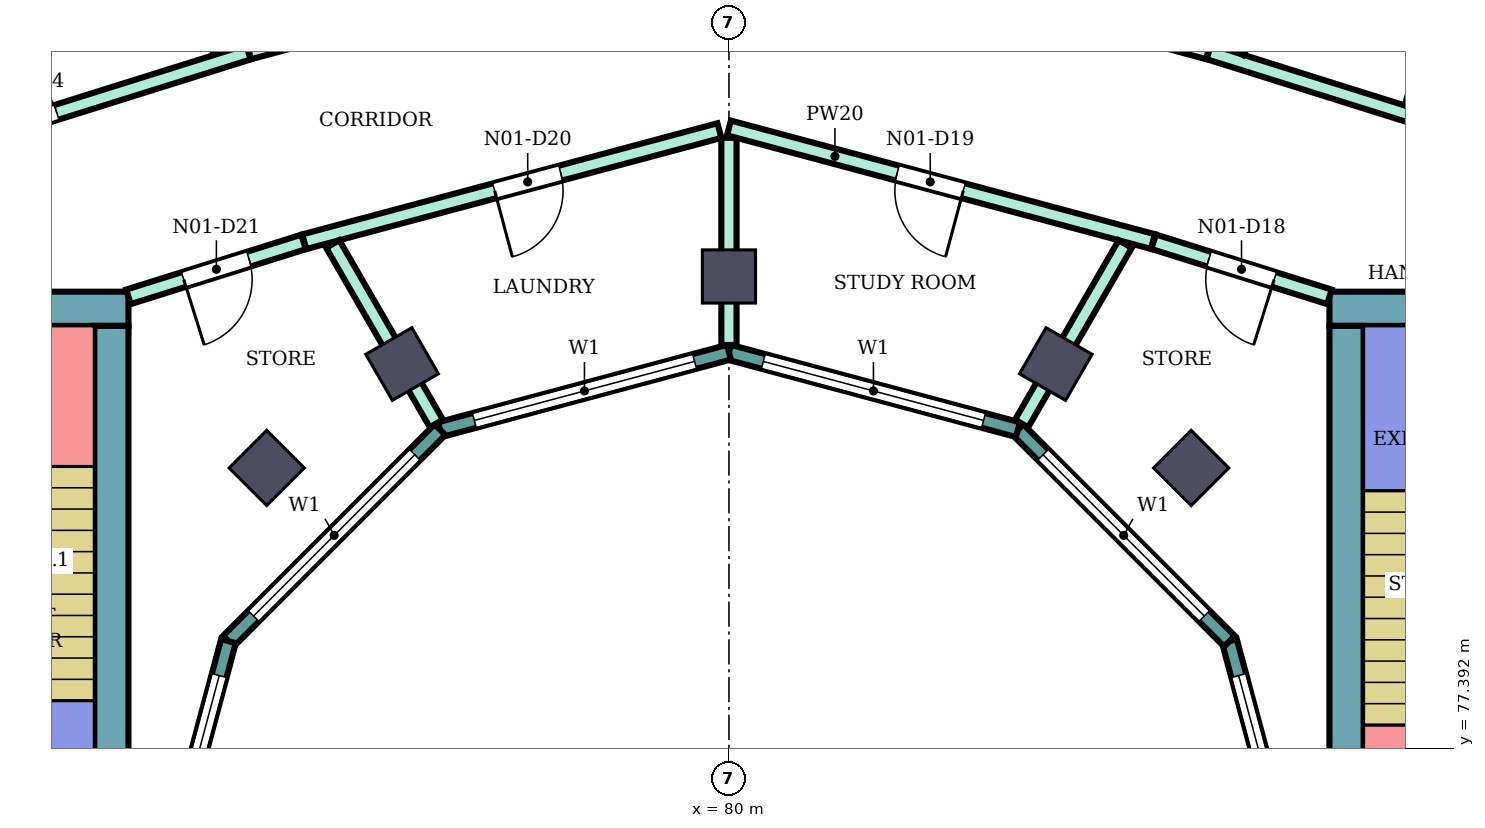
"""IFC4 building model, lengths in metres.
Left out: names, types, materials, properties, quantities, classifications, styles, units other than length and angle.
Written with IfcOpenShell. Run it as: python <this file> out.ifc"""

import sys

from ifc_helpers import new_model, si_unit, direction, frame, frame_2d, origin, origin_2d, place, context, subcontext, project, spatial, rectangle, extrude, element, fill, save


model = new_model("IFC4")
c1 = context("Model", 3, precision=1e-05, world=origin(), true_north=direction((0.0, 1.0)))
c2 = subcontext(c1, "Body", "Model", "MODEL_VIEW")
j1 = project(units=[si_unit("LENGTHUNIT", "METRE"), si_unit("PLANEANGLEUNIT", "RADIAN")], contexts=[c1])
p1 = place(None, origin())
s1 = spatial("IfcSite", under=j1, at=p1, CompositionType="ELEMENT")
p2 = place(p1, origin())
s2 = spatial("IfcBuilding", under=s1, at=p2, CompositionType="ELEMENT")
p3 = place(p2, frame((0.0, 0.0, 284.1)))
s3 = spatial("IfcBuildingStorey", under=s2, at=p3, CompositionType="ELEMENT", Elevation=284.1)
for number, where, z_axis, x_axis in (
    (1, (86.081, 81.081, 0.0), (0.0, 0.0, 1.0), (0.707, 0.707, 0.0)),
    (2, (84.3, 82.448, 0.0), (0.0, 0.0, 1.0), (0.5, 0.866, 0.0)),
    (3, (80.0, 83.6, 0.0), (0.0, 0.0, 1.0), (0.0, 1.0, 0.0)),
    (4, (75.7, 82.448, 0.0), (0.0, 0.0, 1.0), (-0.5, 0.866, 0.0)),
    (5, (73.919, 81.081, 0.0), (0.0, 0.0, 1.0), (-0.707, 0.707, 0.0)),
):
    element("IfcColumn", number, at=place(p3, frame(where, z_axis=z_axis, x_axis=x_axis)), inside=s3, PredefinedType="COLUMN", context=c2, shape_type="SweptSolid", body=[
        extrude(rectangle(XDim=0.7, YDim=0.7, at=origin_2d()), origin(), (0.0, 0.0, 1.0), 4.2),
    ])
p4 = place(p3, frame((87.9, 83.175, 0.0), z_axis=(0.0, 0.0, 1.0), x_axis=(1.0, 0.0, 0.0)))
e6 = element("IfcWall", 6, at=p4, inside=s3, PredefinedType="SHEAR", context=c2, shape_type="SweptSolid", body=[
    extrude(rectangle(XDim=13.55, YDim=0.45, at=frame_2d((6.775, 0.0))), origin(), (0.0, 0.0, 1.0), 3.88),
])
p5 = place(p4, frame((4.2, 0.0, 0.0)))
e7 = element("IfcOpeningElement", 7, at=p5, cuts=e6, PredefinedType="OPENING", context=c2, shape_type="SweptSolid", body=[
    extrude(rectangle(XDim=2.4, YDim=2.4, at=frame_2d((1.2, 1.2))), frame((0.0, 0.235, 0.0), z_axis=(0.0, -1.0, 0.0), x_axis=(1.0, 0.0, 0.0)), (0.0, 0.0, 1.0), 0.47),
])
p6 = place(p3, frame((88.125, 75.0, 0.0), z_axis=(0.0, 0.0, 1.0), x_axis=(0.0, 1.0, 0.0)))
e8 = element("IfcWall", 8, at=p6, inside=s3, PredefinedType="SHEAR", context=c2, shape_type="SweptSolid", body=[
    extrude(rectangle(XDim=7.95, YDim=0.45, at=frame_2d((3.975, 0.0))), origin(), (0.0, 0.0, 1.0), 3.88),
])
p7 = place(p3, frame((72.1, 83.175, 0.0), z_axis=(0.0, 0.0, 1.0), x_axis=(-1.0, 0.0, 0.0)))
e9 = element("IfcWall", 9, at=p7, inside=s3, PredefinedType="SHEAR", context=c2, shape_type="SweptSolid", body=[
    extrude(rectangle(XDim=13.55, YDim=0.45, at=frame_2d((6.775, 0.0))), origin(), (0.0, 0.0, 1.0), 3.88),
])
p8 = place(p7, frame((4.2, 0.0, 0.0)))
e10 = element("IfcOpeningElement", 10, at=p8, cuts=e9, PredefinedType="OPENING", context=c2, shape_type="SweptSolid", body=[
    extrude(rectangle(XDim=2.4, YDim=2.4, at=frame_2d((1.2, 1.2))), frame((0.0, 0.235, 0.0), z_axis=(0.0, -1.0, 0.0), x_axis=(1.0, 0.0, 0.0)), (0.0, 0.0, 1.0), 0.47),
])
p9 = place(p3, frame((71.875, 82.95, 0.0), z_axis=(0.0, 0.0, 1.0), x_axis=(0.0, -1.0, 0.0)))
e11 = element("IfcWall", 11, at=p9, inside=s3, PredefinedType="SHEAR", context=c2, shape_type="SweptSolid", body=[
    extrude(rectangle(XDim=7.95, YDim=0.45, at=frame_2d((3.975, 0.0))), origin(), (0.0, 0.0, 1.0), 3.88),
])
p10 = place(p3, frame((87.604, 75.0, 0.0), z_axis=(0.0, 0.0, 1.0), x_axis=(-0.258789828301, 0.965933654434, 0.0)))
e12 = element("IfcWall", 12, at=p10, inside=s3, PredefinedType="NOTDEFINED", context=c2, shape_type="SweptSolid", body=[
    extrude(rectangle(XDim=3.936, YDim=0.2, at=frame_2d((1.968, 0.0))), origin(), (0.0, 0.0, 1.0), 4.2),
])
p11 = place(p10, frame((0.468, 0.0, 0.9)))
e13 = element("IfcOpeningElement", 13, at=p11, cuts=e12, PredefinedType="OPENING", context=c2, shape_type="SweptSolid", body=[
    extrude(rectangle(XDim=3.0, YDim=2.3, at=frame_2d((1.5, 1.15))), frame((0.0, 0.11, 0.0), z_axis=(0.0, -1.0, 0.0), x_axis=(1.0, 0.0, 0.0)), (0.0, 0.0, 1.0), 0.22),
])
p12 = place(p3, frame((86.585, 78.802, 0.0), z_axis=(0.0, 0.0, 1.0), x_axis=(-0.707106781187, 0.707106781187, 0.0)))
e14 = element("IfcWall", 14, at=p12, inside=s3, PredefinedType="NOTDEFINED", context=c2, shape_type="SweptSolid", body=[
    extrude(rectangle(XDim=3.936, YDim=0.2, at=frame_2d((1.968, 0.0))), origin(), (0.0, 0.0, 1.0), 4.2),
])
p13 = place(p12, frame((0.468, 0.0, 0.9)))
e15 = element("IfcOpeningElement", 15, at=p13, cuts=e14, PredefinedType="OPENING", context=c2, shape_type="SweptSolid", body=[
    extrude(rectangle(XDim=3.0, YDim=2.3, at=frame_2d((1.5, 1.15))), frame((0.0, 0.11, 0.0), z_axis=(0.0, -1.0, 0.0), x_axis=(1.0, 0.0, 0.0)), (0.0, 0.0, 1.0), 0.22),
])
p14 = place(p3, frame((83.802, 81.585, 0.0), z_axis=(0.0, 0.0, 1.0), x_axis=(-0.965933654434, 0.258789828301, 0.0)))
e16 = element("IfcWall", 16, at=p14, inside=s3, PredefinedType="NOTDEFINED", context=c2, shape_type="SweptSolid", body=[
    extrude(rectangle(XDim=3.936, YDim=0.2, at=frame_2d((1.968, 0.0))), origin(), (0.0, 0.0, 1.0), 4.2),
])
p15 = place(p14, frame((0.468, 0.0, 0.9)))
e17 = element("IfcOpeningElement", 17, at=p15, cuts=e16, PredefinedType="OPENING", context=c2, shape_type="SweptSolid", body=[
    extrude(rectangle(XDim=3.0, YDim=2.3, at=frame_2d((1.5, 1.15))), frame((0.0, 0.11, 0.0), z_axis=(0.0, -1.0, 0.0), x_axis=(1.0, 0.0, 0.0)), (0.0, 0.0, 1.0), 0.22),
])
p16 = place(p3, frame((80.0, 82.604, 0.0), z_axis=(0.0, 0.0, 1.0), x_axis=(-0.965933654434, -0.258789828301, 0.0)))
e18 = element("IfcWall", 18, at=p16, inside=s3, PredefinedType="NOTDEFINED", context=c2, shape_type="SweptSolid", body=[
    extrude(rectangle(XDim=3.936, YDim=0.2, at=frame_2d((1.968, 0.0))), origin(), (0.0, 0.0, 1.0), 4.2),
])
p17 = place(p16, frame((0.468, 0.0, 0.9)))
e19 = element("IfcOpeningElement", 19, at=p17, cuts=e18, PredefinedType="OPENING", context=c2, shape_type="SweptSolid", body=[
    extrude(rectangle(XDim=3.0, YDim=2.3, at=frame_2d((1.5, 1.15))), frame((0.0, 0.11, 0.0), z_axis=(0.0, -1.0, 0.0), x_axis=(1.0, 0.0, 0.0)), (0.0, 0.0, 1.0), 0.22),
])
p18 = place(p3, frame((76.198, 81.585, 0.0), z_axis=(0.0, 0.0, 1.0), x_axis=(-0.707106781187, -0.707106781187, 0.0)))
e20 = element("IfcWall", 20, at=p18, inside=s3, PredefinedType="NOTDEFINED", context=c2, shape_type="SweptSolid", body=[
    extrude(rectangle(XDim=3.936, YDim=0.2, at=frame_2d((1.968, 0.0))), origin(), (0.0, 0.0, 1.0), 4.2),
])
p19 = place(p18, frame((0.468, 0.0, 0.9)))
e21 = element("IfcOpeningElement", 21, at=p19, cuts=e20, PredefinedType="OPENING", context=c2, shape_type="SweptSolid", body=[
    extrude(rectangle(XDim=3.0, YDim=2.3, at=frame_2d((1.5, 1.15))), frame((0.0, 0.11, 0.0), z_axis=(0.0, -1.0, 0.0), x_axis=(1.0, 0.0, 0.0)), (0.0, 0.0, 1.0), 0.22),
])
p20 = place(p3, frame((73.415, 78.802, 0.0), z_axis=(0.0, 0.0, 1.0), x_axis=(-0.258789828301, -0.965933654434, 0.0)))
e22 = element("IfcWall", 22, at=p20, inside=s3, PredefinedType="NOTDEFINED", context=c2, shape_type="SweptSolid", body=[
    extrude(rectangle(XDim=3.936, YDim=0.2, at=frame_2d((1.968, 0.0))), origin(), (0.0, 0.0, 1.0), 4.2),
])
p21 = place(p20, frame((0.468, 0.0, 0.9)))
e23 = element("IfcOpeningElement", 23, at=p21, cuts=e22, PredefinedType="OPENING", context=c2, shape_type="SweptSolid", body=[
    extrude(rectangle(XDim=3.0, YDim=2.3, at=frame_2d((1.5, 1.15))), frame((0.0, 0.11, 0.0), z_axis=(0.0, -1.0, 0.0), x_axis=(1.0, 0.0, 0.0)), (0.0, 0.0, 1.0), 0.22),
])
p22 = place(p3, frame((67.852, 96.042, 0.0), z_axis=(0.0, 0.0, 1.0), x_axis=(0.499960582802, -0.866048160118, 0.0)))
e24 = element("IfcWall", 24, at=p22, inside=s3, PredefinedType="PARTITIONING", context=c2, shape_type="SweptSolid", body=[
    extrude(rectangle(XDim=10.946, YDim=0.2, at=frame_2d((5.473, 0.0))), origin(), (0.0, 0.0, 1.0), 3.75),
])
p23 = place(p3, frame((68.2, 84.833, 0.0), z_axis=(0.0, 0.0, 1.0), x_axis=(0.954191968402, 0.299195065863, 0.0)))
e25 = element("IfcWall", 25, at=p23, inside=s3, PredefinedType="PARTITIONING", context=c2, shape_type="SweptSolid", body=[
    extrude(rectangle(XDim=5.74, YDim=0.2, at=frame_2d((2.87, 0.0))), origin(), (0.0, 0.0, 1.0), 3.75),
])
p24 = place(p23, frame((2.097, 0.0, 0.0)))
e26 = element("IfcOpeningElement", 26, at=p24, cuts=e25, PredefinedType="OPENING", context=c2, shape_type="SweptSolid", body=[
    extrude(rectangle(XDim=1.0, YDim=2.1, at=frame_2d((0.5, 1.05))), frame((0.0, 0.11, 0.0), z_axis=(0.0, -1.0, 0.0), x_axis=(1.0, 0.0, 0.0)), (0.0, 0.0, 1.0), 0.22),
])
p25 = place(p3, frame((72.1, 83.332, 0.0), z_axis=(0.0, 0.0, 1.0), x_axis=(0.954233106619, 0.299063836383, 0.0)))
e27 = element("IfcWall", 27, at=p25, inside=s3, PredefinedType="PARTITIONING", context=c2, shape_type="SweptSolid", body=[
    extrude(rectangle(XDim=2.414, YDim=0.2, at=frame_2d((1.207, 0.0))), origin(), (0.0, 0.0, 1.0), 3.75),
])
p26 = place(p25, frame((0.762, 0.0, 0.0)))
e28 = element("IfcOpeningElement", 28, at=p26, cuts=e27, PredefinedType="OPENING", context=c2, shape_type="SweptSolid", body=[
    extrude(rectangle(XDim=0.9, YDim=2.1, at=frame_2d((0.45, 1.05))), frame((0.0, 0.11, 0.0), z_axis=(0.0, -1.0, 0.0), x_axis=(1.0, 0.0, 0.0)), (0.0, 0.0, 1.0), 0.22),
])
p27 = place(p3, frame((73.687, 86.554, 0.0), z_axis=(0.0, 0.0, 1.0), x_axis=(0.966002126521, 0.258534120682, 0.0)))
e29 = element("IfcWall", 29, at=p27, inside=s3, PredefinedType="PARTITIONING", context=c2, shape_type="SweptSolid", body=[
    extrude(rectangle(XDim=6.486, YDim=0.2, at=frame_2d((3.243, 0.0))), origin(), (0.0, 0.0, 1.0), 3.75),
])
p28 = place(p3, frame((74.413, 84.057, 0.0), z_axis=(0.0, 0.0, 1.0), x_axis=(0.965972135939, 0.258646153246, 0.0)))
e30 = element("IfcWall", 30, at=p28, inside=s3, PredefinedType="PARTITIONING", context=c2, shape_type="SweptSolid", body=[
    extrude(rectangle(XDim=5.654, YDim=0.2, at=frame_2d((2.827, 0.0))), origin(), (0.0, 0.0, 1.0), 3.75),
])
p29 = place(p28, frame((2.593, 0.0, 0.0)))
e31 = element("IfcOpeningElement", 31, at=p29, cuts=e30, PredefinedType="OPENING", context=c2, shape_type="SweptSolid", body=[
    extrude(rectangle(XDim=0.9, YDim=2.1, at=frame_2d((0.45, 1.05))), frame((0.0, 0.11, 0.0), z_axis=(0.0, -1.0, 0.0), x_axis=(1.0, 0.0, 0.0)), (0.0, 0.0, 1.0), 0.22),
])
p30 = place(p3, frame((74.788, 84.027, 0.0), z_axis=(0.0, 0.0, 1.0), x_axis=(0.49997314572, -0.866040907555, 0.0)))
e32 = element("IfcWall", 32, at=p30, inside=s3, PredefinedType="PARTITIONING", context=c2, shape_type="SweptSolid", body=[
    extrude(rectangle(XDim=2.726, YDim=0.2, at=frame_2d((1.363, 0.0))), origin(), (0.0, 0.0, 1.0), 3.75),
])
p31 = place(p3, frame((80.0, 82.699, 0.0), z_axis=(0.0, 0.0, 1.0), x_axis=(0.0, 1.0, 0.0)))
e33 = element("IfcWall", 33, at=p31, inside=s3, PredefinedType="PARTITIONING", context=c2, shape_type="SweptSolid", body=[
    extrude(rectangle(XDim=2.725, YDim=0.2, at=frame_2d((1.363, 0.0))), origin(), (0.0, 0.0, 1.0), 3.75),
])
p32 = place(p3, frame((80.0, 85.554, 0.0), z_axis=(0.0, 0.0, 1.0), x_axis=(0.965928989968, -0.258807237802, 0.0)))
e34 = element("IfcWall", 34, at=p32, inside=s3, PredefinedType="PARTITIONING", context=c2, shape_type="SweptSolid", body=[
    extrude(rectangle(XDim=5.774, YDim=0.2, at=frame_2d((2.887, 0.0))), origin(), (0.0, 0.0, 1.0), 3.75),
])
p33 = place(p32, frame((2.292, 0.0, 0.0)))
e35 = element("IfcOpeningElement", 35, at=p33, cuts=e34, PredefinedType="OPENING", context=c2, shape_type="SweptSolid", body=[
    extrude(rectangle(XDim=0.9, YDim=2.1, at=frame_2d((0.45, 1.05))), frame((0.0, 0.11, 0.0), z_axis=(0.0, -1.0, 0.0), x_axis=(1.0, 0.0, 0.0)), (0.0, 0.0, 1.0), 0.22),
])
p34 = place(p3, frame((80.048, 88.233, 0.0), z_axis=(0.0, 0.0, 1.0), x_axis=(0.965865387308, -0.259044501198, 0.0)))
e36 = element("IfcWall", 36, at=p34, inside=s3, PredefinedType="PARTITIONING", context=c2, shape_type="SweptSolid", body=[
    extrude(rectangle(XDim=6.476, YDim=0.2, at=frame_2d((3.238, 0.0))), origin(), (0.0, 0.0, 1.0), 3.75),
])
p35 = place(p34, frame((4.936, 0.0, 0.0)))
e37 = element("IfcOpeningElement", 37, at=p35, cuts=e36, PredefinedType="OPENING", context=c2, shape_type="SweptSolid", body=[
    extrude(rectangle(XDim=1.0, YDim=2.1, at=frame_2d((0.5, 1.05))), frame((0.0, 0.11, 0.0), z_axis=(0.0, -1.0, 0.0), x_axis=(1.0, 0.0, 0.0)), (0.0, 0.0, 1.0), 0.22),
])
p36 = place(p3, frame((83.85, 81.666, 0.0), z_axis=(0.0, 0.0, 1.0), x_axis=(0.500146274735, 0.865940935554, 0.0)))
e38 = element("IfcWall", 38, at=p36, inside=s3, PredefinedType="PARTITIONING", context=c2, shape_type="SweptSolid", body=[
    extrude(rectangle(XDim=2.726, YDim=0.2, at=frame_2d((1.363, 0.0))), origin(), (0.0, 0.0, 1.0), 3.75),
])
p37 = place(p3, frame((85.587, 84.057, 0.0), z_axis=(0.0, 0.0, 1.0), x_axis=(0.954239513179, -0.299043393987, 0.0)))
e39 = element("IfcWall", 39, at=p37, inside=s3, PredefinedType="PARTITIONING", context=c2, shape_type="SweptSolid", body=[
    extrude(rectangle(XDim=2.424, YDim=0.2, at=frame_2d((1.212, 0.0))), origin(), (0.0, 0.0, 1.0), 3.75),
])
p38 = place(p37, frame((0.762, 0.0, 0.0)))
e40 = element("IfcOpeningElement", 40, at=p38, cuts=e39, PredefinedType="OPENING", context=c2, shape_type="SweptSolid", body=[
    extrude(rectangle(XDim=0.9, YDim=2.1, at=frame_2d((0.45, 1.05))), frame((0.0, 0.11, 0.0), z_axis=(0.0, -1.0, 0.0), x_axis=(1.0, 0.0, 0.0)), (0.0, 0.0, 1.0), 0.22),
])
p39 = place(p3, frame((86.313, 86.554, 0.0), z_axis=(0.0, 0.0, 1.0), x_axis=(0.954089584911, -0.299521391497, 0.0)))
e41 = element("IfcWall", 41, at=p39, inside=s3, PredefinedType="PARTITIONING", context=c2, shape_type="SweptSolid", body=[
    extrude(rectangle(XDim=5.72, YDim=0.2, at=frame_2d((2.86, 0.0))), origin(), (0.0, 0.0, 1.0), 3.75),
])
p40 = place(p3, frame((86.678, 86.562, 0.0), z_axis=(0.0, 0.0, 1.0), x_axis=(0.500133037155, 0.865948581122, 0.0)))
e42 = element("IfcWall", 42, at=p40, inside=s3, PredefinedType="PARTITIONING", context=c2, shape_type="SweptSolid", body=[
    extrude(rectangle(XDim=10.946, YDim=0.2, at=frame_2d((5.473, 0.0))), origin(), (0.0, 0.0, 1.0), 3.75),
])
p41 = place(p3, frame((88.936, 85.836, 0.0), z_axis=(0.0, 0.0, 1.0), x_axis=(0.299371771011, 0.954136543018, 0.0)))
e43 = element("IfcWall", 43, at=p41, inside=s3, PredefinedType="PARTITIONING", context=c2, shape_type="SweptSolid", body=[
    extrude(rectangle(XDim=2.75, YDim=0.1, at=frame_2d((1.375, 0.0))), origin(), (0.0, 0.0, 1.0), 3.75),
])
p42 = place(p11, origin())
e44 = element("IfcWindow", 44, at=p42, inside=s3, PartitioningType="SINGLE_PANEL", PredefinedType="WINDOW", context=c2, shape_type="SweptSolid", body=[
    extrude(rectangle(XDim=3.0, YDim=2.3, at=frame_2d((1.5, 1.15))), frame((0.0, 0.03, 0.0), z_axis=(0.0, -1.0, 0.0), x_axis=(1.0, 0.0, 0.0)), (0.0, 0.0, 1.0), 0.06),
])
fill(e13, e44)
p43 = place(p13, origin())
e45 = element("IfcWindow", 45, at=p43, inside=s3, PartitioningType="SINGLE_PANEL", PredefinedType="WINDOW", context=c2, shape_type="SweptSolid", body=[
    extrude(rectangle(XDim=3.0, YDim=2.3, at=frame_2d((1.5, 1.15))), frame((0.0, 0.03, 0.0), z_axis=(0.0, -1.0, 0.0), x_axis=(1.0, 0.0, 0.0)), (0.0, 0.0, 1.0), 0.06),
])
fill(e15, e45)
p44 = place(p15, origin())
e46 = element("IfcWindow", 46, at=p44, inside=s3, PartitioningType="SINGLE_PANEL", PredefinedType="WINDOW", context=c2, shape_type="SweptSolid", body=[
    extrude(rectangle(XDim=3.0, YDim=2.3, at=frame_2d((1.5, 1.15))), frame((0.0, 0.03, 0.0), z_axis=(0.0, -1.0, 0.0), x_axis=(1.0, 0.0, 0.0)), (0.0, 0.0, 1.0), 0.06),
])
fill(e17, e46)
p45 = place(p17, origin())
e47 = element("IfcWindow", 47, at=p45, inside=s3, PartitioningType="SINGLE_PANEL", PredefinedType="WINDOW", context=c2, shape_type="SweptSolid", body=[
    extrude(rectangle(XDim=3.0, YDim=2.3, at=frame_2d((1.5, 1.15))), frame((0.0, 0.03, 0.0), z_axis=(0.0, -1.0, 0.0), x_axis=(1.0, 0.0, 0.0)), (0.0, 0.0, 1.0), 0.06),
])
fill(e19, e47)
p46 = place(p19, origin())
e48 = element("IfcWindow", 48, at=p46, inside=s3, PartitioningType="SINGLE_PANEL", PredefinedType="WINDOW", context=c2, shape_type="SweptSolid", body=[
    extrude(rectangle(XDim=3.0, YDim=2.3, at=frame_2d((1.5, 1.15))), frame((0.0, 0.03, 0.0), z_axis=(0.0, -1.0, 0.0), x_axis=(1.0, 0.0, 0.0)), (0.0, 0.0, 1.0), 0.06),
])
fill(e21, e48)
p47 = place(p21, origin())
e49 = element("IfcWindow", 49, at=p47, inside=s3, PartitioningType="SINGLE_PANEL", PredefinedType="WINDOW", context=c2, shape_type="SweptSolid", body=[
    extrude(rectangle(XDim=3.0, YDim=2.3, at=frame_2d((1.5, 1.15))), frame((0.0, 0.03, 0.0), z_axis=(0.0, -1.0, 0.0), x_axis=(1.0, 0.0, 0.0)), (0.0, 0.0, 1.0), 0.06),
])
fill(e23, e49)
p48 = place(p24, origin())
e50 = element("IfcDoor", 50, at=p48, inside=s3, OperationType="SINGLE_SWING_LEFT", PredefinedType="DOOR", context=c2, shape_type="SweptSolid", body=[
    extrude(rectangle(XDim=1.0, YDim=2.1, at=frame_2d((0.5, 1.05))), frame((0.0, 0.025, 0.0), z_axis=(0.0, -1.0, 0.0), x_axis=(1.0, 0.0, 0.0)), (0.0, 0.0, 1.0), 0.05),
])
fill(e26, e50)
p49 = place(p38, frame((0.9, 0.0, 0.0), z_axis=(0.0, 0.0, 1.0), x_axis=(-1.0, 0.0, 0.0)))
e51 = element("IfcDoor", 51, at=p49, inside=s3, OperationType="SINGLE_SWING_LEFT", PredefinedType="DOOR", context=c2, shape_type="SweptSolid", body=[
    extrude(rectangle(XDim=0.9, YDim=2.1, at=frame_2d((0.45, 1.05))), frame((0.0, 0.025, 0.0), z_axis=(0.0, -1.0, 0.0), x_axis=(1.0, 0.0, 0.0)), (0.0, 0.0, 1.0), 0.05),
])
fill(e40, e51)
p50 = place(p33, frame((0.9, 0.0, 0.0), z_axis=(0.0, 0.0, 1.0), x_axis=(-1.0, 0.0, 0.0)))
e52 = element("IfcDoor", 52, at=p50, inside=s3, OperationType="SINGLE_SWING_LEFT", PredefinedType="DOOR", context=c2, shape_type="SweptSolid", body=[
    extrude(rectangle(XDim=0.9, YDim=2.1, at=frame_2d((0.45, 1.05))), frame((0.0, 0.025, 0.0), z_axis=(0.0, -1.0, 0.0), x_axis=(1.0, 0.0, 0.0)), (0.0, 0.0, 1.0), 0.05),
])
fill(e35, e52)
p51 = place(p29, frame((0.9, 0.0, 0.0), z_axis=(0.0, 0.0, 1.0), x_axis=(-1.0, 0.0, 0.0)))
e53 = element("IfcDoor", 53, at=p51, inside=s3, OperationType="SINGLE_SWING_RIGHT", PredefinedType="DOOR", context=c2, shape_type="SweptSolid", body=[
    extrude(rectangle(XDim=0.9, YDim=2.1, at=frame_2d((0.45, 1.05))), frame((0.0, 0.025, 0.0), z_axis=(0.0, -1.0, 0.0), x_axis=(1.0, 0.0, 0.0)), (0.0, 0.0, 1.0), 0.05),
])
fill(e31, e53)
p52 = place(p26, frame((0.9, 0.0, 0.0), z_axis=(0.0, 0.0, 1.0), x_axis=(-1.0, 0.0, 0.0)))
e54 = element("IfcDoor", 54, at=p52, inside=s3, OperationType="SINGLE_SWING_RIGHT", PredefinedType="DOOR", context=c2, shape_type="SweptSolid", body=[
    extrude(rectangle(XDim=0.9, YDim=2.1, at=frame_2d((0.45, 1.05))), frame((0.0, 0.025, 0.0), z_axis=(0.0, -1.0, 0.0), x_axis=(1.0, 0.0, 0.0)), (0.0, 0.0, 1.0), 0.05),
])
fill(e28, e54)
save(model, sys.argv[1])
